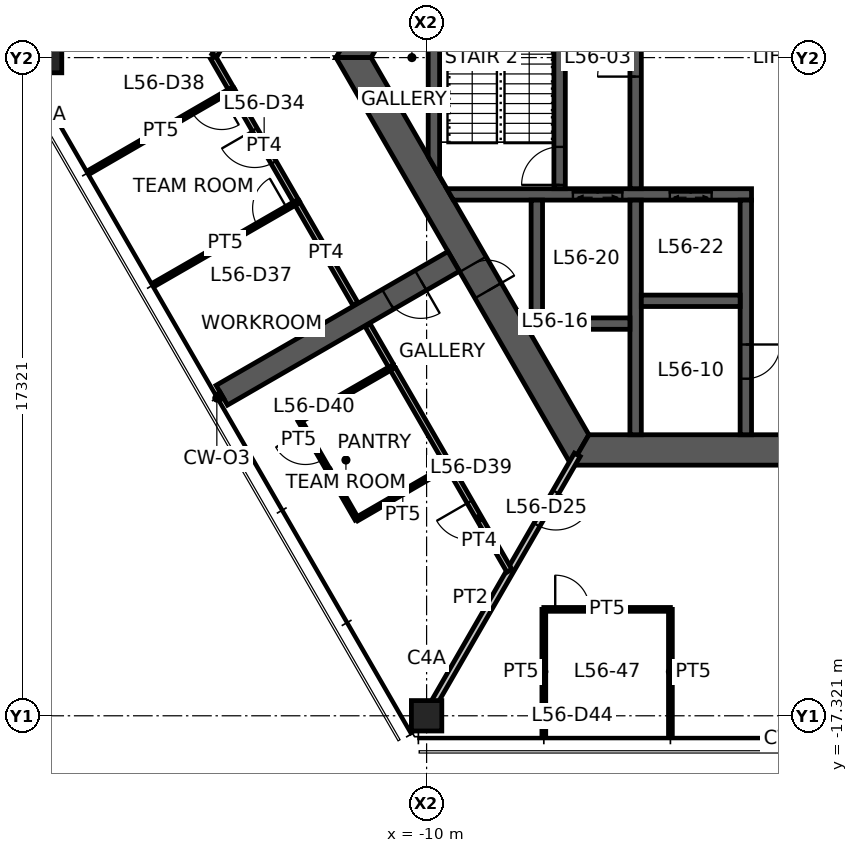
"""IFC4 building model, lengths in metres.
Left out: names, types, materials, properties, quantities, classifications, styles, units other than length and angle.
Written with IfcOpenShell. Run it as: python <this file> out.ifc"""

import sys

from ifc_helpers import new_model, si_unit, direction, frame, frame_2d, origin, origin_2d, place, context, subcontext, project, spatial, polyline, rectangle, hollow_rectangle, outline, extrude, element, fill, save


model = new_model("IFC4")
c1 = context("Model", 3, precision=1e-05, world=origin(), true_north=direction((0.0, 1.0)))
c2 = subcontext(c1, "Body", "Model", "MODEL_VIEW")
j1 = project(units=[si_unit("LENGTHUNIT", "METRE"), si_unit("PLANEANGLEUNIT", "RADIAN")], contexts=[c1])
p1 = place(None, origin())
s1 = spatial("IfcSite", under=j1, at=p1, CompositionType="ELEMENT")
p2 = place(p1, origin())
s2 = spatial("IfcBuilding", under=s1, at=p2, CompositionType="ELEMENT")
p3 = place(p2, frame((0.0, 0.0, 224.5)))
s3 = spatial("IfcBuildingStorey", under=s2, at=p3, CompositionType="ELEMENT", Elevation=224.5)
for number, where, z_axis, x_axis in (
    (1, (-20.0, 0.0, 0.0), (0.0, 0.0, 1.0), (1.0, 0.0, 0.0)),
    (2, (-10.0, -17.321, 0.0), (0.0, 0.0, 1.0), (1.0, 0.0, 0.0)),
):
    element("IfcColumn", number, at=place(p3, frame(where, z_axis=z_axis, x_axis=x_axis)), inside=s3, PredefinedType="COLUMN", context=c2, shape_type="SweptSolid", body=[
        extrude(hollow_rectangle(XDim=0.8, YDim=0.8, WallThickness=0.04, at=origin_2d()), origin(), (0.0, 0.0, 1.0), 3.9),
    ])
p4 = place(p3, frame((-5.961, 10.325, 0.0), z_axis=(0.0, 0.0, 1.0), x_axis=(-0.500004296715, -0.866022923061, 0.0)))
e3 = element("IfcWall", 3, at=p4, inside=s3, PredefinedType="SHEAR", context=c2, shape_type="SweptSolid", body=[
    extrude(outline(polyline([(-0.231, -0.4), (4.494, -0.4), (5.494, -0.4), (12.153, -0.4), (11.691, 0.4), (5.494, 0.4), (4.494, 0.4), (0.231, 0.4), (-0.231, -0.4)])), origin(), (0.0, 0.0, 1.0), 3.9),
])
p5 = place(p4, frame((4.494, 0.0, 0.0)))
e4 = element("IfcOpeningElement", 4, at=p5, cuts=e3, PredefinedType="OPENING", context=c2, shape_type="SweptSolid", body=[
    extrude(rectangle(XDim=1.0, YDim=2.1, at=frame_2d((0.5, 1.05))), frame((0.0, 0.41, 0.0), z_axis=(0.0, -1.0, 0.0), x_axis=(1.0, 0.0, 0.0)), (0.0, 0.0, 1.0), 0.82),
])
p6 = place(p3, frame((-11.922, 0.0, 0.0), z_axis=(0.0, 0.0, 1.0), x_axis=(0.500004296715, -0.866022923061, 0.0)))
e5 = element("IfcWall", 5, at=p6, inside=s3, PredefinedType="SHEAR", context=c2, shape_type="SweptSolid", body=[
    extrude(outline(polyline([(-0.231, -0.4), (6.281, -0.4), (7.081, -0.4), (12.153, -0.4), (11.691, 0.4), (7.081, 0.4), (6.281, 0.4), (0.231, 0.4), (-0.231, -0.4)])), origin(), (0.0, 0.0, 1.0), 3.9),
])
p7 = place(p6, frame((6.281, 0.0, 0.0)))
e6 = element("IfcOpeningElement", 6, at=p7, cuts=e5, PredefinedType="OPENING", context=c2, shape_type="SweptSolid", body=[
    extrude(rectangle(XDim=0.8, YDim=2.1, at=frame_2d((0.4, 1.05))), frame((0.0, 0.41, 0.0), z_axis=(0.0, -1.0, 0.0), x_axis=(1.0, 0.0, 0.0)), (0.0, 0.0, 1.0), 0.82),
])
p8 = place(p3, frame((-5.961, -10.325, 0.0), z_axis=(0.0, 0.0, 1.0), x_axis=(1.0, 0.0, 0.0)))
e7 = element("IfcWall", 7, at=p8, inside=s3, PredefinedType="SHEAR", context=c2, shape_type="SweptSolid", body=[
    extrude(outline(polyline([(-0.231, -0.4), (5.461, -0.4), (6.461, -0.4), (12.153, -0.4), (11.691, 0.4), (6.461, 0.4), (5.461, 0.4), (0.231, 0.4), (-0.231, -0.4)])), origin(), (0.0, 0.0, 1.0), 3.9),
])
p9 = place(p8, frame((5.461, 0.0, 0.0)))
e8 = element("IfcOpeningElement", 8, at=p9, cuts=e7, PredefinedType="OPENING", context=c2, shape_type="SweptSolid", body=[
    extrude(rectangle(XDim=1.0, YDim=2.1, at=frame_2d((0.5, 1.05))), frame((0.0, 0.41, 0.0), z_axis=(0.0, -1.0, 0.0), x_axis=(1.0, 0.0, 0.0)), (0.0, 0.0, 1.0), 0.82),
])
p10 = place(p3, frame((-9.288, -5.363, 0.0), z_axis=(0.0, 0.0, 1.0), x_axis=(-0.866027473358, -0.499996415376, 0.0)))
e9 = element("IfcWall", 9, at=p10, inside=s3, PredefinedType="SHEAR", context=c2, shape_type="SweptSolid", body=[
    extrude(rectangle(XDim=7.045, YDim=0.6, at=frame_2d((3.523, 0.0))), origin(), (0.0, 0.0, 1.0), 3.9),
])
p11 = place(p10, frame((1.0, 0.0, 0.0)))
e10 = element("IfcOpeningElement", 10, at=p11, cuts=e9, PredefinedType="OPENING", context=c2, shape_type="SweptSolid", body=[
    extrude(rectangle(XDim=1.0, YDim=2.1, at=frame_2d((0.5, 1.05))), frame((0.0, 0.31, 0.0), z_axis=(0.0, -1.0, 0.0), x_axis=(1.0, 0.0, 0.0)), (0.0, 0.0, 1.0), 0.62),
])
p12 = place(p3, frame((-9.382, -3.6, 0.0), z_axis=(0.0, 0.0, 1.0), x_axis=(1.0, 0.0, 0.0)))
e11 = element("IfcWall", 11, at=p12, inside=s3, PredefinedType="SHEAR", context=c2, shape_type="SweptSolid", body=[
    extrude(outline(polyline([(0.087, -0.15), (3.232, -0.15), (4.532, -0.15), (5.782, -0.15), (6.882, -0.15), (7.932, -0.15), (7.932, 0.15), (6.882, 0.15), (5.782, 0.15), (4.532, 0.15), (3.232, 0.15), (-0.087, 0.15), (0.087, -0.15)])), origin(), (0.0, 0.0, 1.0), 3.9),
])
p13 = place(p12, frame((5.782, 0.0, 0.0)))
e12 = element("IfcOpeningElement", 12, at=p13, cuts=e11, PredefinedType="OPENING", context=c2, shape_type="SweptSolid", body=[
    extrude(rectangle(XDim=1.1, YDim=2.1, at=frame_2d((0.55, 1.05))), frame((0.0, 0.16, 0.0), z_axis=(0.0, -1.0, 0.0), x_axis=(1.0, 0.0, 0.0)), (0.0, 0.0, 1.0), 0.32),
])
p14 = place(p12, frame((3.232, 0.0, 0.0)))
e13 = element("IfcOpeningElement", 13, at=p14, cuts=e11, PredefinedType="OPENING", context=c2, shape_type="SweptSolid", body=[
    extrude(rectangle(XDim=1.3, YDim=2.1, at=frame_2d((0.65, 1.05))), frame((0.0, 0.16, 0.0), z_axis=(0.0, -1.0, 0.0), x_axis=(1.0, 0.0, 0.0)), (0.0, 0.0, 1.0), 0.32),
])
p15 = place(p3, frame((-1.6, -3.75, 0.0), z_axis=(0.0, 0.0, 1.0), x_axis=(0.0, -1.0, 0.0)))
e14 = element("IfcWall", 14, at=p15, inside=s3, PredefinedType="SHEAR", context=c2, shape_type="SweptSolid", body=[
    extrude(rectangle(XDim=6.175, YDim=0.3, at=frame_2d((3.087, 0.0))), origin(), (0.0, 0.0, 1.0), 3.9),
])
p16 = place(p15, frame((3.8, 0.0, 0.0)))
e15 = element("IfcOpeningElement", 15, at=p16, cuts=e14, PredefinedType="OPENING", context=c2, shape_type="SweptSolid", body=[
    extrude(rectangle(XDim=0.9, YDim=2.1, at=frame_2d((0.45, 1.05))), frame((0.0, 0.16, 0.0), z_axis=(0.0, -1.0, 0.0), x_axis=(1.0, 0.0, 0.0)), (0.0, 0.0, 1.0), 0.32),
])
p17 = place(p3, frame((-4.5, -3.45, 0.0), z_axis=(0.0, 0.0, 1.0), x_axis=(0.0, 1.0, 0.0)))
e16 = element("IfcWall", 16, at=p17, inside=s3, PredefinedType="SHEAR", context=c2, shape_type="SweptSolid", body=[
    extrude(rectangle(XDim=6.9, YDim=0.3, at=frame_2d((3.45, 0.0))), origin(), (0.0, 0.0, 1.0), 3.9),
])
p18 = place(p17, frame((2.95, 0.0, 0.0)))
e17 = element("IfcOpeningElement", 17, at=p18, cuts=e16, PredefinedType="OPENING", context=c2, shape_type="SweptSolid", body=[
    extrude(rectangle(XDim=1.0, YDim=2.1, at=frame_2d((0.5, 1.05))), frame((0.0, 0.16, 0.0), z_axis=(0.0, -1.0, 0.0), x_axis=(1.0, 0.0, 0.0)), (0.0, 0.0, 1.0), 0.32),
])
p19 = place(p3, frame((-6.5, -3.45, 0.0), z_axis=(0.0, 0.0, 1.0), x_axis=(0.0, 1.0, 0.0)))
e18 = element("IfcWall", 18, at=p19, inside=s3, PredefinedType="SHEAR", context=c2, shape_type="SweptSolid", body=[
    extrude(rectangle(XDim=6.9, YDim=0.3, at=frame_2d((3.45, 0.0))), origin(), (0.0, 0.0, 1.0), 3.9),
])
p20 = place(p19, frame((0.1, 0.0, 0.0)))
e19 = element("IfcOpeningElement", 19, at=p20, cuts=e18, PredefinedType="OPENING", context=c2, shape_type="SweptSolid", body=[
    extrude(rectangle(XDim=1.0, YDim=2.1, at=frame_2d((0.5, 1.05))), frame((0.0, 0.16, 0.0), z_axis=(0.0, -1.0, 0.0), x_axis=(1.0, 0.0, 0.0)), (0.0, 0.0, 1.0), 0.32),
])
p21 = place(p3, frame((-4.5, -3.75, 0.0), z_axis=(0.0, 0.0, 1.0), x_axis=(0.0, -1.0, 0.0)))
e20 = element("IfcWall", 20, at=p21, inside=s3, PredefinedType="SHEAR", context=c2, shape_type="SweptSolid", body=[
    extrude(rectangle(XDim=6.175, YDim=0.3, at=frame_2d((3.087, 0.0))), origin(), (0.0, 0.0, 1.0), 3.9),
])
for number, where, z_axis, x_axis in (
    (21, (-4.35, -6.4, 0.0), (0.0, 0.0, 1.0), (1.0, 0.0, 0.0)),
    (22, (-7.25, -7.0, 0.0), (0.0, 0.0, 1.0), (1.0, 0.0, 0.0)),
):
    element("IfcWall", number, at=place(p3, frame(where, z_axis=z_axis, x_axis=x_axis)), inside=s3, PredefinedType="SHEAR", context=c2, shape_type="SweptSolid", body=[
        extrude(rectangle(XDim=2.6, YDim=0.3, at=frame_2d((1.3, 0.0))), origin(), (0.0, 0.0, 1.0), 3.9),
    ])
p22 = place(p3, frame((-7.1, -3.75, 0.0), z_axis=(0.0, 0.0, 1.0), x_axis=(0.0, -1.0, 0.0)))
e23 = element("IfcWall", 23, at=p22, inside=s3, PredefinedType="SHEAR", context=c2, shape_type="SweptSolid", body=[
    extrude(rectangle(XDim=3.1, YDim=0.3, at=frame_2d((1.55, 0.0))), origin(), (0.0, 0.0, 1.0), 3.9),
])
p23 = place(p3, frame((-9.808, -2.862, 0.0), z_axis=(0.0, 0.0, 1.0), x_axis=(0.0, 1.0, 0.0)))
e24 = element("IfcWall", 24, at=p23, inside=s3, PredefinedType="SHEAR", context=c2, shape_type="SweptSolid", body=[
    extrude(outline(polyline([(-0.26, -0.15), (5.984, -0.15), (5.465, 0.15), (0.26, 0.15), (-0.26, -0.15)])), origin(), (0.0, 0.0, 1.0), 3.9),
])
p24 = place(p3, frame((-6.035, -10.453, 0.0), z_axis=(0.0, 0.0, 1.0), x_axis=(-0.499989830942, -0.866031274813, 0.0)))
e25 = element("IfcWall", 25, at=p24, inside=s3, PredefinedType="PARTITIONING", context=c2, shape_type="SweptSolid", body=[
    extrude(rectangle(XDim=7.93, YDim=0.175, at=frame_2d((3.965, 0.0))), origin(), (0.0, 0.0, 1.0), 3.05),
])
p25 = place(p24, frame((1.13, 0.0, 0.0)))
e26 = element("IfcOpeningElement", 26, at=p25, cuts=e25, PredefinedType="OPENING", context=c2, shape_type="SweptSolid", body=[
    extrude(rectangle(XDim=1.0, YDim=2.1, at=frame_2d((0.5, 1.05))), frame((0.0, 0.098, 0.0), z_axis=(0.0, -1.0, 0.0), x_axis=(1.0, 0.0, 0.0)), (0.0, 0.0, 1.0), 0.195),
])
p26 = place(p3, frame((-11.873, -6.485, 0.0), z_axis=(0.0, 0.0, 1.0), x_axis=(-0.499958760481, 0.866049212123, 0.0)))
e27 = element("IfcWall", 27, at=p26, inside=s3, PredefinedType="PARTITIONING", context=c2, shape_type="SweptSolid", body=[
    extrude(rectangle(XDim=3.1, YDim=0.15, at=frame_2d((1.55, 0.0))), origin(), (0.0, 0.0, 1.0), 2.95),
])
p27 = place(p3, frame((-15.585, 0.056, 0.0), z_axis=(0.0, 0.0, 1.0), x_axis=(0.500164219654, 0.865930570761, 0.0)))
e28 = element("IfcWall", 28, at=p27, inside=s3, PredefinedType="PARTITIONING", context=c2, shape_type="SweptSolid", body=[
    extrude(rectangle(XDim=0.287, YDim=0.15, at=frame_2d((0.144, 0.0))), origin(), (0.0, 0.0, 1.0), 2.95),
])
p28 = place(p3, frame((-15.126, -0.851, 0.0), z_axis=(0.0, 0.0, 1.0), x_axis=(-0.499880173341, 0.866094574686, 0.0)))
e29 = element("IfcWall", 29, at=p28, inside=s3, PredefinedType="PARTITIONING", context=c2, shape_type="SweptSolid", body=[
    extrude(rectangle(XDim=0.983, YDim=0.15, at=frame_2d((0.491, 0.0))), origin(), (0.0, 0.0, 1.0), 2.95),
])
p29 = place(p3, frame((-13.418, -3.809, 0.0), z_axis=(0.0, 0.0, 1.0), x_axis=(-0.499996058069, 0.866027679647, 0.0)))
e30 = element("IfcWall", 30, at=p29, inside=s3, PredefinedType="PARTITIONING", context=c2, shape_type="SweptSolid", body=[
    extrude(rectangle(XDim=3.424, YDim=0.15, at=frame_2d((1.712, 0.0))), origin(), (0.0, 0.0, 1.0), 2.95),
])
p30 = place(p29, frame((1.212, 0.0, 0.0)))
e31 = element("IfcOpeningElement", 31, at=p30, cuts=e30, PredefinedType="OPENING", context=c2, shape_type="SweptSolid", body=[
    extrude(rectangle(XDim=1.0, YDim=2.1, at=frame_2d((0.5, 1.05))), frame((0.0, 0.085, 0.0), z_axis=(0.0, -1.0, 0.0), x_axis=(1.0, 0.0, 0.0)), (0.0, 0.0, 1.0), 0.17),
])
p31 = place(p3, frame((-17.171, -5.97, 0.0), z_axis=(0.0, 0.0, 1.0), x_axis=(0.866548575966, 0.499092742374, 0.0)))
e32 = element("IfcWall", 32, at=p31, inside=s3, PredefinedType="PARTITIONING", context=c2, shape_type="SweptSolid", body=[
    extrude(rectangle(XDim=4.331, YDim=0.1, at=frame_2d((2.165, 0.0))), origin(), (0.0, 0.0, 1.0), 2.95),
])
p32 = place(p31, frame((3.131, 0.0, 0.0)))
e33 = element("IfcOpeningElement", 33, at=p32, cuts=e32, PredefinedType="OPENING", context=c2, shape_type="SweptSolid", body=[
    extrude(rectangle(XDim=0.9, YDim=2.1, at=frame_2d((0.45, 1.05))), frame((0.0, 0.06, 0.0), z_axis=(0.0, -1.0, 0.0), x_axis=(1.0, 0.0, 0.0)), (0.0, 0.0, 1.0), 0.12),
])
p33 = place(p3, frame((-15.131, -0.843, 0.0), z_axis=(0.0, 0.0, 1.0), x_axis=(-0.865525911664, -0.500864149484, 0.0)))
e34 = element("IfcWall", 34, at=p33, inside=s3, PredefinedType="PARTITIONING", context=c2, shape_type="SweptSolid", body=[
    extrude(rectangle(XDim=4.306, YDim=0.1, at=frame_2d((2.153, 0.0))), origin(), (0.0, 0.0, 1.0), 2.95),
])
p34 = place(p33, frame((0.3, 0.0, 0.0)))
e35 = element("IfcOpeningElement", 35, at=p34, cuts=e34, PredefinedType="OPENING", context=c2, shape_type="SweptSolid", body=[
    extrude(rectangle(XDim=0.9, YDim=2.1, at=frame_2d((0.45, 1.05))), frame((0.0, 0.06, 0.0), z_axis=(0.0, -1.0, 0.0), x_axis=(1.0, 0.0, 0.0)), (0.0, 0.0, 1.0), 0.12),
])
p35 = place(p3, frame((-9.41, -10.75, 0.0), z_axis=(0.0, 0.0, 1.0), x_axis=(-0.500038395149, 0.8660032352, 0.0)))
e36 = element("IfcWall", 36, at=p35, inside=s3, PredefinedType="PARTITIONING", context=c2, shape_type="SweptSolid", body=[
    extrude(rectangle(XDim=3.01, YDim=0.15, at=frame_2d((1.505, 0.0))), origin(), (0.0, 0.0, 1.0), 2.95),
])
p36 = place(p3, frame((-10.911, -8.152, 0.0), z_axis=(0.0, 0.0, 1.0), x_axis=(-0.499859560919, 0.866106471144, 0.0)))
e37 = element("IfcWall", 37, at=p36, inside=s3, PredefinedType="PARTITIONING", context=c2, shape_type="SweptSolid", body=[
    extrude(rectangle(XDim=1.284, YDim=0.15, at=frame_2d((0.642, 0.0))), origin(), (0.0, 0.0, 1.0), 2.95),
])
p37 = place(p3, frame((-7.82, -13.505, 0.0), z_axis=(0.0, 0.0, 1.0), x_axis=(-0.499983030129, 0.866035201123, 0.0)))
e38 = element("IfcWall", 38, at=p37, inside=s3, PredefinedType="PARTITIONING", context=c2, shape_type="SweptSolid", body=[
    extrude(rectangle(XDim=3.19, YDim=0.15, at=frame_2d((1.595, 0.0))), origin(), (0.0, 0.0, 1.0), 2.95),
])
p38 = place(p37, frame((1.095, 0.0, 0.0)))
e39 = element("IfcOpeningElement", 39, at=p38, cuts=e38, PredefinedType="OPENING", context=c2, shape_type="SweptSolid", body=[
    extrude(rectangle(XDim=1.0, YDim=2.1, at=frame_2d((0.5, 1.05))), frame((0.0, 0.085, 0.0), z_axis=(0.0, -1.0, 0.0), x_axis=(1.0, 0.0, 0.0)), (0.0, 0.0, 1.0), 0.17),
])
p39 = place(p3, frame((-13.338, -9.548, 0.0), z_axis=(0.0, 0.0, 1.0), x_axis=(0.866833758708, 0.498597267105, 0.0)))
e40 = element("IfcWall", 40, at=p39, inside=s3, PredefinedType="PARTITIONING", context=c2, shape_type="SweptSolid", body=[
    extrude(rectangle(XDim=2.8, YDim=0.1, at=frame_2d((1.4, 0.0))), origin(), (0.0, 0.0, 1.0), 2.95),
])
p40 = place(p3, frame((-11.838, -12.146, 0.0), z_axis=(0.0, 0.0, 1.0), x_axis=(-0.499990139034, 0.866031096941, 0.0)))
e41 = element("IfcWall", 41, at=p40, inside=s3, PredefinedType="PARTITIONING", context=c2, shape_type="SweptSolid", body=[
    extrude(rectangle(XDim=3.0, YDim=0.1, at=frame_2d((1.5, 0.0))), origin(), (0.0, 0.0, 1.0), 2.95),
])
p41 = place(p40, frame((1.8, 0.0, 0.0)))
e42 = element("IfcOpeningElement", 42, at=p41, cuts=e41, PredefinedType="OPENING", context=c2, shape_type="SweptSolid", body=[
    extrude(rectangle(XDim=0.9, YDim=2.1, at=frame_2d((0.45, 1.05))), frame((0.0, 0.06, 0.0), z_axis=(0.0, -1.0, 0.0), x_axis=(1.0, 0.0, 0.0)), (0.0, 0.0, 1.0), 0.12),
])
p42 = place(p3, frame((-9.415, -10.742, 0.0), z_axis=(0.0, 0.0, 1.0), x_axis=(-0.865195372903, -0.501434907746, 0.0)))
e43 = element("IfcWall", 43, at=p42, inside=s3, PredefinedType="PARTITIONING", context=c2, shape_type="SweptSolid", body=[
    extrude(rectangle(XDim=2.8, YDim=0.1, at=frame_2d((1.4, 0.0))), origin(), (0.0, 0.0, 1.0), 2.95),
])
p43 = place(p3, frame((-6.916, -17.801, 0.0), z_axis=(0.0, 0.0, 1.0), x_axis=(0.0, 1.0, 0.0)))
e44 = element("IfcWall", 44, at=p43, inside=s3, PredefinedType="PARTITIONING", context=c2, shape_type="SweptSolid", body=[
    extrude(rectangle(XDim=3.28, YDim=0.1, at=frame_2d((1.64, 0.0))), origin(), (0.0, 0.0, 1.0), 2.95),
])
p44 = place(p3, frame((-6.916, -14.521, 0.0), z_axis=(0.0, 0.0, 1.0), x_axis=(1.0, 0.0, 0.0)))
e45 = element("IfcWall", 45, at=p44, inside=s3, PredefinedType="PARTITIONING", context=c2, shape_type="SweptSolid", body=[
    extrude(rectangle(XDim=3.331, YDim=0.1, at=frame_2d((1.666, 0.0))), origin(), (0.0, 0.0, 1.0), 2.95),
])
p45 = place(p44, frame((0.3, 0.0, 0.0)))
e46 = element("IfcOpeningElement", 46, at=p45, cuts=e45, PredefinedType="OPENING", context=c2, shape_type="SweptSolid", body=[
    extrude(rectangle(XDim=0.9, YDim=2.1, at=frame_2d((0.45, 1.05))), frame((0.0, 0.06, 0.0), z_axis=(0.0, -1.0, 0.0), x_axis=(1.0, 0.0, 0.0)), (0.0, 0.0, 1.0), 0.12),
])
p46 = place(p3, frame((-3.584, -14.521, 0.0), z_axis=(0.0, 0.0, 1.0), x_axis=(0.0, -1.0, 0.0)))
e47 = element("IfcWall", 47, at=p46, inside=s3, PredefinedType="PARTITIONING", context=c2, shape_type="SweptSolid", body=[
    extrude(rectangle(XDim=3.28, YDim=0.1, at=frame_2d((1.64, 0.0))), origin(), (0.0, 0.0, 1.0), 2.95),
])
p47 = place(p3, frame((-15.39, -8.885, 0.0), z_axis=(0.0, 0.0, 1.0), x_axis=(-0.866472036435, -0.499225610396, 0.0)))
e48 = element("IfcWall", 48, at=p47, inside=s3, PredefinedType="PARTITIONING", context=c2, shape_type="SweptSolid", body=[
    extrude(rectangle(XDim=0.085, YDim=0.175, at=frame_2d((0.042, 0.0))), origin(), (0.0, 0.0, 1.0), 3.9),
])
p48 = place(p7, origin())
e49 = element("IfcDoor", 49, at=p48, inside=s3, OperationType="SINGLE_SWING_RIGHT", PredefinedType="DOOR", context=c2, shape_type="SweptSolid", body=[
    extrude(rectangle(XDim=0.8, YDim=2.1, at=frame_2d((0.4, 1.05))), frame((0.0, 0.025, 0.0), z_axis=(0.0, -1.0, 0.0), x_axis=(1.0, 0.0, 0.0)), (0.0, 0.0, 1.0), 0.05),
])
fill(e6, e49)
p49 = place(p18, origin())
e50 = element("IfcDoor", 50, at=p49, inside=s3, OperationType="SINGLE_SWING_LEFT", PredefinedType="DOOR", context=c2, shape_type="SweptSolid", body=[
    extrude(rectangle(XDim=1.0, YDim=2.1, at=frame_2d((0.5, 1.05))), frame((0.0, 0.025, 0.0), z_axis=(0.0, -1.0, 0.0), x_axis=(1.0, 0.0, 0.0)), (0.0, 0.0, 1.0), 0.05),
])
fill(e17, e50)
p50 = place(p20, origin())
e51 = element("IfcDoor", 51, at=p50, inside=s3, OperationType="SINGLE_SWING_LEFT", PredefinedType="DOOR", context=c2, shape_type="SweptSolid", body=[
    extrude(rectangle(XDim=1.0, YDim=2.1, at=frame_2d((0.5, 1.05))), frame((0.0, 0.025, 0.0), z_axis=(0.0, -1.0, 0.0), x_axis=(1.0, 0.0, 0.0)), (0.0, 0.0, 1.0), 0.05),
])
fill(e19, e51)
p51 = place(p16, origin())
e52 = element("IfcDoor", 52, at=p51, inside=s3, OperationType="SINGLE_SWING_LEFT", PredefinedType="DOOR", context=c2, shape_type="SweptSolid", body=[
    extrude(rectangle(XDim=0.9, YDim=2.1, at=frame_2d((0.45, 1.05))), frame((0.0, 0.025, 0.0), z_axis=(0.0, -1.0, 0.0), x_axis=(1.0, 0.0, 0.0)), (0.0, 0.0, 1.0), 0.05),
])
fill(e15, e52)
p52 = place(p11, origin())
e53 = element("IfcDoor", 53, at=p52, inside=s3, OperationType="SINGLE_SWING_LEFT", PredefinedType="DOOR", context=c2, shape_type="SweptSolid", body=[
    extrude(rectangle(XDim=1.0, YDim=2.1, at=frame_2d((0.5, 1.05))), frame((0.0, 0.025, 0.0), z_axis=(0.0, -1.0, 0.0), x_axis=(1.0, 0.0, 0.0)), (0.0, 0.0, 1.0), 0.05),
])
fill(e10, e53)
p53 = place(p25, origin())
e54 = element("IfcDoor", 54, at=p53, inside=s3, OperationType="SINGLE_SWING_LEFT", PredefinedType="DOOR", context=c2, shape_type="SweptSolid", body=[
    extrude(rectangle(XDim=1.0, YDim=2.1, at=frame_2d((0.5, 1.05))), frame((0.0, 0.025, 0.0), z_axis=(0.0, -1.0, 0.0), x_axis=(1.0, 0.0, 0.0)), (0.0, 0.0, 1.0), 0.05),
])
fill(e26, e54)
p54 = place(p30, origin())
e55 = element("IfcDoor", 55, at=p54, inside=s3, OperationType="SINGLE_SWING_RIGHT", PredefinedType="DOOR", context=c2, shape_type="SweptSolid", body=[
    extrude(rectangle(XDim=1.0, YDim=2.1, at=frame_2d((0.5, 1.05))), frame((0.0, 0.025, 0.0), z_axis=(0.0, -1.0, 0.0), x_axis=(1.0, 0.0, 0.0)), (0.0, 0.0, 1.0), 0.05),
])
fill(e31, e55)
p55 = place(p32, origin())
e56 = element("IfcDoor", 56, at=p55, inside=s3, OperationType="SINGLE_SWING_RIGHT", PredefinedType="DOOR", context=c2, shape_type="SweptSolid", body=[
    extrude(rectangle(XDim=0.9, YDim=2.1, at=frame_2d((0.45, 1.05))), frame((0.0, 0.025, 0.0), z_axis=(0.0, -1.0, 0.0), x_axis=(1.0, 0.0, 0.0)), (0.0, 0.0, 1.0), 0.05),
])
fill(e33, e56)
p56 = place(p34, origin())
e57 = element("IfcDoor", 57, at=p56, inside=s3, OperationType="SINGLE_SWING_LEFT", PredefinedType="DOOR", context=c2, shape_type="SweptSolid", body=[
    extrude(rectangle(XDim=0.9, YDim=2.1, at=frame_2d((0.45, 1.05))), frame((0.0, 0.025, 0.0), z_axis=(0.0, -1.0, 0.0), x_axis=(1.0, 0.0, 0.0)), (0.0, 0.0, 1.0), 0.05),
])
fill(e35, e57)
p57 = place(p38, origin())
e58 = element("IfcDoor", 58, at=p57, inside=s3, OperationType="SINGLE_SWING_RIGHT", PredefinedType="DOOR", context=c2, shape_type="SweptSolid", body=[
    extrude(rectangle(XDim=1.0, YDim=2.1, at=frame_2d((0.5, 1.05))), frame((0.0, 0.025, 0.0), z_axis=(0.0, -1.0, 0.0), x_axis=(1.0, 0.0, 0.0)), (0.0, 0.0, 1.0), 0.05),
])
fill(e39, e58)
p58 = place(p41, origin())
e59 = element("IfcDoor", 59, at=p58, inside=s3, OperationType="SINGLE_SWING_RIGHT", PredefinedType="DOOR", context=c2, shape_type="SweptSolid", body=[
    extrude(rectangle(XDim=0.9, YDim=2.1, at=frame_2d((0.45, 1.05))), frame((0.0, 0.025, 0.0), z_axis=(0.0, -1.0, 0.0), x_axis=(1.0, 0.0, 0.0)), (0.0, 0.0, 1.0), 0.05),
])
fill(e42, e59)
p59 = place(p45, origin())
e60 = element("IfcDoor", 60, at=p59, inside=s3, OperationType="SINGLE_SWING_LEFT", PredefinedType="DOOR", context=c2, shape_type="SweptSolid", body=[
    extrude(rectangle(XDim=0.9, YDim=2.1, at=frame_2d((0.45, 1.05))), frame((0.0, 0.025, 0.0), z_axis=(0.0, -1.0, 0.0), x_axis=(1.0, 0.0, 0.0)), (0.0, 0.0, 1.0), 0.05),
])
fill(e46, e60)
p60 = place(p13, origin())
e61 = element("IfcDoor", 61, at=p60, inside=s3, OperationType="DOUBLE_DOOR_SLIDING", PredefinedType="DOOR", context=c2, shape_type="SweptSolid", body=[
    extrude(rectangle(XDim=1.1, YDim=2.1, at=frame_2d((0.55, 1.05))), frame((0.0, 0.025, 0.0), z_axis=(0.0, -1.0, 0.0), x_axis=(1.0, 0.0, 0.0)), (0.0, 0.0, 1.0), 0.05),
])
fill(e12, e61)
p61 = place(p14, origin())
e62 = element("IfcDoor", 62, at=p61, inside=s3, OperationType="DOUBLE_DOOR_SLIDING", PredefinedType="DOOR", context=c2, shape_type="SweptSolid", body=[
    extrude(rectangle(XDim=1.3, YDim=2.1, at=frame_2d((0.65, 1.05))), frame((0.0, 0.025, 0.0), z_axis=(0.0, -1.0, 0.0), x_axis=(1.0, 0.0, 0.0)), (0.0, 0.0, 1.0), 0.05),
])
fill(e13, e62)
save(model, sys.argv[1])
